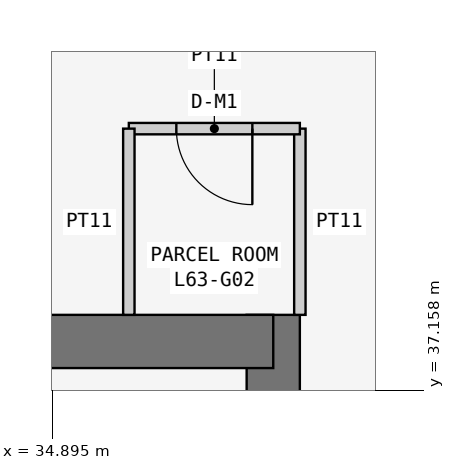
"""IFC4 building model, lengths in metres.
Left out: names, types, materials, properties, quantities, classifications, styles, units other than length and angle.
Written with IfcOpenShell. Run it as: python <this file> out.ifc"""

import sys

from ifc_helpers import new_model, si_unit, direction, frame, frame_2d, origin, place, context, subcontext, project, spatial, rectangle, extrude, element, fill, save


model = new_model("IFC4")
c1 = context("Model", 3, precision=1e-05, world=origin(), true_north=direction((0.0, 1.0)))
c2 = subcontext(c1, "Body", "Model", "MODEL_VIEW")
j1 = project(units=[si_unit("LENGTHUNIT", "METRE"), si_unit("PLANEANGLEUNIT", "RADIAN")], contexts=[c1])
p1 = place(None, origin())
s1 = spatial("IfcSite", under=j1, at=p1, CompositionType="ELEMENT")
p2 = place(p1, origin())
s2 = spatial("IfcBuilding", under=s1, at=p2, CompositionType="ELEMENT")
p3 = place(p2, frame((0.0, 0.0, 240.9)))
s3 = spatial("IfcBuildingStorey", under=s2, at=p3, CompositionType="ELEMENT", Elevation=240.9)
p4 = place(p3, frame((37.8, 21.0, 0.0), z_axis=(0.0, 0.0, 1.0), x_axis=(0.0, 1.0, 0.0)))
e1 = element("IfcWall", 1, at=p4, inside=s3, PredefinedType="SHEAR", context=c2, shape_type="SweptSolid", body=[
    extrude(rectangle(XDim=17.15, YDim=0.7, at=frame_2d((8.575, 0.0))), origin(), (0.0, 0.0, 1.0), 3.6),
])
p5 = place(p4, frame((5.2, 0.0, 0.0)))
e2 = element("IfcOpeningElement", 2, at=p5, cuts=e1, PredefinedType="OPENING", context=c2, shape_type="SweptSolid", body=[
    extrude(rectangle(XDim=1.2, YDim=2.1, at=frame_2d((0.6, 1.05))), frame((0.0, 0.36, 0.0), z_axis=(0.0, -1.0, 0.0), x_axis=(1.0, 0.0, 0.0)), (0.0, 0.0, 1.0), 0.72),
])
p6 = place(p3, frame((37.8, 37.8, 0.0), z_axis=(0.0, 0.0, 1.0), x_axis=(-1.0, 0.0, 0.0)))
e3 = element("IfcWall", 3, at=p6, inside=s3, PredefinedType="SHEAR", context=c2, shape_type="SweptSolid", body=[
    extrude(rectangle(XDim=17.15, YDim=0.7, at=frame_2d((8.575, 0.0))), origin(), (0.0, 0.0, 1.0), 3.6),
])
p7 = place(p3, frame((38.15, 38.15, 0.0), z_axis=(0.0, 0.0, 1.0), x_axis=(0.0, 1.0, 0.0)))
e4 = element("IfcWall", 4, at=p7, inside=s3, PredefinedType="PARTITIONING", context=c2, shape_type="SweptSolid", body=[
    extrude(rectangle(XDim=2.45, YDim=0.15, at=frame_2d((1.225, 0.0))), origin(), (0.0, 0.0, 1.0), 3.45),
])
p8 = place(p3, frame((38.15, 40.6, 0.0), z_axis=(0.0, 0.0, 1.0), x_axis=(-1.0, 0.0, 0.0)))
e5 = element("IfcWall", 5, at=p8, inside=s3, PredefinedType="PARTITIONING", context=c2, shape_type="SweptSolid", body=[
    extrude(rectangle(XDim=2.25, YDim=0.15, at=frame_2d((1.125, 0.0))), origin(), (0.0, 0.0, 1.0), 3.45),
])
p9 = place(p8, frame((0.625, 0.0, 0.0)))
e6 = element("IfcOpeningElement", 6, at=p9, cuts=e5, PredefinedType="OPENING", context=c2, shape_type="SweptSolid", body=[
    extrude(rectangle(XDim=1.0, YDim=2.1, at=frame_2d((0.5, 1.05))), frame((0.0, 0.085, 0.0), z_axis=(0.0, -1.0, 0.0), x_axis=(1.0, 0.0, 0.0)), (0.0, 0.0, 1.0), 0.17),
])
p10 = place(p3, frame((35.9, 40.6, 0.0), z_axis=(0.0, 0.0, 1.0), x_axis=(0.0, -1.0, 0.0)))
e7 = element("IfcWall", 7, at=p10, inside=s3, PredefinedType="PARTITIONING", context=c2, shape_type="SweptSolid", body=[
    extrude(rectangle(XDim=2.45, YDim=0.15, at=frame_2d((1.225, 0.0))), origin(), (0.0, 0.0, 1.0), 3.45),
])
p11 = place(p9, origin())
e8 = element("IfcDoor", 8, at=p11, inside=s3, OperationType="SINGLE_SWING_LEFT", PredefinedType="DOOR", context=c2, shape_type="SweptSolid", body=[
    extrude(rectangle(XDim=1.0, YDim=2.1, at=frame_2d((0.5, 1.05))), frame((0.0, 0.025, 0.0), z_axis=(0.0, -1.0, 0.0), x_axis=(1.0, 0.0, 0.0)), (0.0, 0.0, 1.0), 0.05),
])
fill(e6, e8)
save(model, sys.argv[1])
